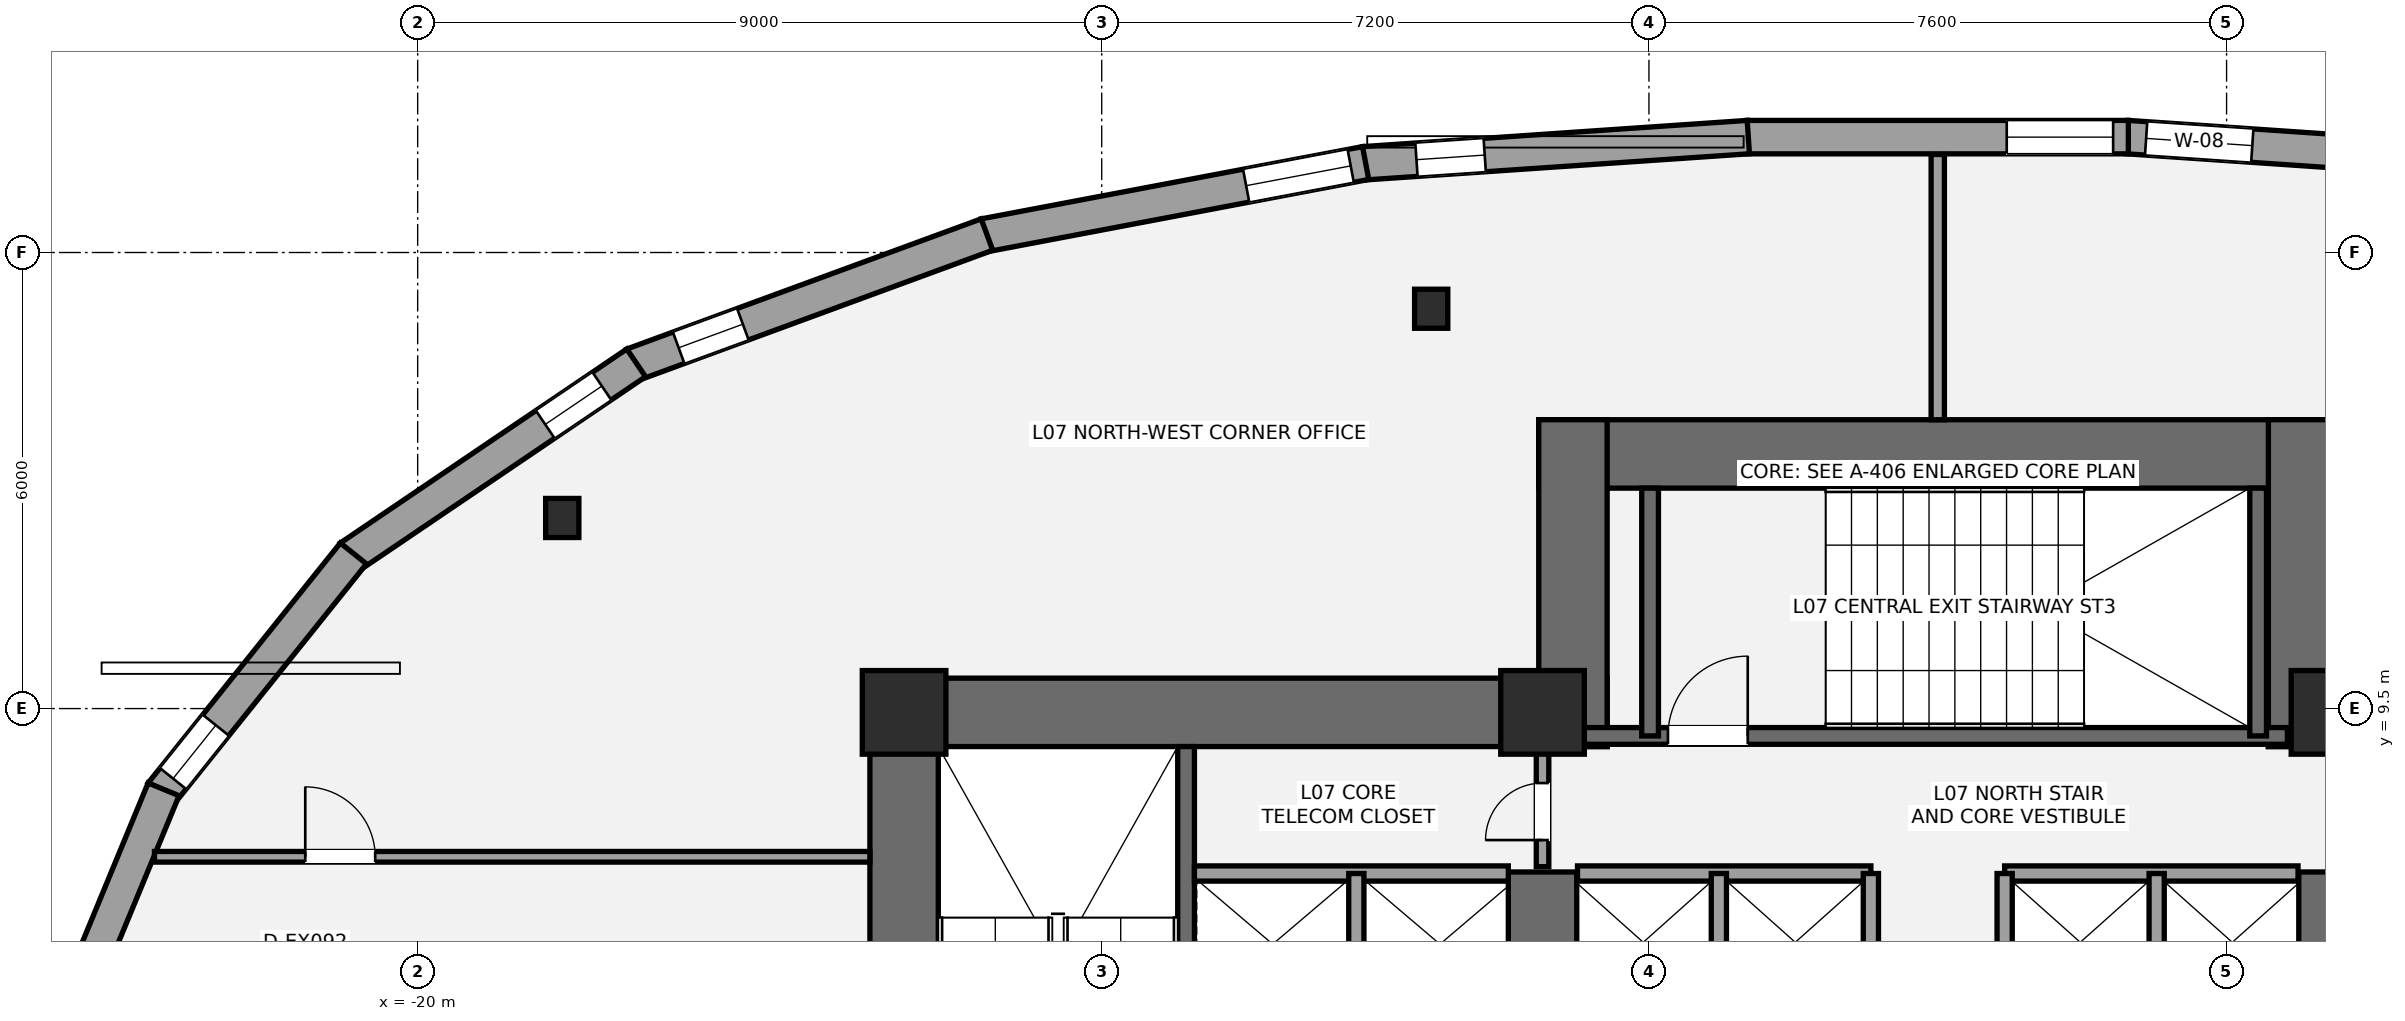
"""IFC4 building model, lengths in metres.
Left out: names, types, materials, properties, quantities, classifications, styles, units other than length and angle.
Written with IfcOpenShell. Run it as: python <this file> out.ifc"""

import sys

from ifc_helpers import new_model, si_unit, direction, frame, frame_2d, origin, origin_2d, place, context, subcontext, project, spatial, rectangle, i_section, extrude, element, fill, save


model = new_model("IFC4")
c1 = context("Model", 3, precision=1e-05, world=origin(), true_north=direction((0.0, 1.0)))
c2 = subcontext(c1, "Body", "Model", "MODEL_VIEW")
j1 = project(units=[si_unit("LENGTHUNIT", "METRE"), si_unit("PLANEANGLEUNIT", "RADIAN")], contexts=[c1])
p1 = place(None, origin())
s1 = spatial("IfcSite", under=j1, at=p1, CompositionType="ELEMENT")
p2 = place(p1, origin())
s2 = spatial("IfcBuilding", under=s1, at=p2, CompositionType="ELEMENT")
p3 = place(p2, frame((0.0, 0.0, 30.6)))
s3 = spatial("IfcBuildingStorey", under=s2, at=p3, CompositionType="ELEMENT", Elevation=30.6)
p4 = place(p3, frame((-13.6, 0.95, 0.0), z_axis=(0.0, 0.0, 1.0), x_axis=(0.0, 1.0, 0.0)))
e1 = element("IfcWall", 1, at=p4, inside=s3, PredefinedType="SHEAR", context=c2, shape_type="SweptSolid", body=[
    extrude(rectangle(XDim=8.95, YDim=0.9, at=frame_2d((4.475, 0.0))), origin(), (0.0, 0.0, 1.0), 3.6),
])
p5 = place(p3, frame((-14.05, 9.45, 0.0), z_axis=(0.0, 0.0, 1.0), x_axis=(1.0, 0.0, 0.0)))
e2 = element("IfcWall", 2, at=p5, inside=s3, PredefinedType="SHEAR", context=c2, shape_type="SweptSolid", body=[
    extrude(rectangle(XDim=9.7, YDim=0.9, at=frame_2d((4.85, 0.0))), origin(), (0.0, 0.0, 1.0), 3.6),
])
p6 = place(p3, frame((-5.2, 5.35, 0.0), z_axis=(0.0, 0.0, 1.0), x_axis=(0.0, 1.0, 0.0)))
e3 = element("IfcWall", 3, at=p6, inside=s3, PredefinedType="SHEAR", context=c2, shape_type="SweptSolid", body=[
    extrude(rectangle(XDim=2.0, YDim=0.9, at=frame_2d((1.0, 0.0))), origin(), (0.0, 0.0, 1.0), 3.6),
])
p7 = place(p3, frame((-9.89, 1.85, 0.0), z_axis=(0.0, 0.0, 1.0), x_axis=(0.0, 1.0, 0.0)))
e4 = element("IfcWall", 4, at=p7, inside=s3, PredefinedType="SHEAR", context=c2, shape_type="SweptSolid", body=[
    extrude(rectangle(XDim=7.15, YDim=0.22, at=frame_2d((3.575, 0.0))), origin(), (0.0, 0.0, 1.0), 3.6),
])
p8 = place(p3, frame((4.35, 9.45, 0.0), z_axis=(0.0, 0.0, 1.0), x_axis=(1.0, 0.0, 0.0)))
e5 = element("IfcWall", 5, at=p8, inside=s3, PredefinedType="SHEAR", context=c2, shape_type="SweptSolid", body=[
    extrude(rectangle(XDim=9.7, YDim=0.9, at=frame_2d((4.85, 0.0))), origin(), (0.0, 0.0, 1.0), 3.6),
])
p9 = place(p3, frame((5.2, 5.35, 0.0), z_axis=(0.0, 0.0, 1.0), x_axis=(0.0, 1.0, 0.0)))
e6 = element("IfcWall", 6, at=p9, inside=s3, PredefinedType="SHEAR", context=c2, shape_type="SweptSolid", body=[
    extrude(rectangle(XDim=2.0, YDim=0.9, at=frame_2d((1.0, 0.0))), origin(), (0.0, 0.0, 1.0), 3.6),
])
p10 = place(p3, frame((-5.25, 12.85, 0.0), z_axis=(0.0, 0.0, 1.0), x_axis=(1.0, 0.0, 0.0)))
e7 = element("IfcWall", 7, at=p10, inside=s3, PredefinedType="SHEAR", context=c2, shape_type="SweptSolid", body=[
    extrude(rectangle(XDim=10.5, YDim=0.9, at=frame_2d((5.25, 0.0))), origin(), (0.0, 0.0, 1.0), 3.6),
])
for number, where, z_axis, x_axis in (
    (8, (-4.8, 9.0, 0.0), (0.0, 0.0, 1.0), (0.0, 1.0, 0.0)),
    (9, (4.8, 9.0, 0.0), (0.0, 0.0, 1.0), (0.0, 1.0, 0.0)),
):
    element("IfcWall", number, at=place(p3, frame(where, z_axis=z_axis, x_axis=x_axis)), inside=s3, PredefinedType="SHEAR", context=c2, shape_type="SweptSolid", body=[
        extrude(rectangle(XDim=4.3, YDim=0.9, at=frame_2d((2.15, 0.0))), origin(), (0.0, 0.0, 1.0), 3.6),
    ])
p11 = place(p3, frame((-4.7, 9.14, 0.0), z_axis=(0.0, 0.0, 1.0), x_axis=(1.0, 0.0, 0.0)))
e10 = element("IfcWall", 10, at=p11, inside=s3, PredefinedType="SHEAR", context=c2, shape_type="SweptSolid", body=[
    extrude(rectangle(XDim=9.3, YDim=0.22, at=frame_2d((4.65, 0.0))), origin(), (0.0, 0.0, 1.0), 3.6),
])
p12 = place(p11, frame((1.15, 0.0, 0.0)))
e11 = element("IfcOpeningElement", 11, at=p12, cuts=e10, PredefinedType="OPENING", context=c2, shape_type="SweptSolid", body=[
    extrude(rectangle(XDim=1.05, YDim=2.15, at=frame_2d((0.525, 1.075))), frame((0.0, 0.12, 0.0), z_axis=(0.0, -1.0, 0.0), x_axis=(1.0, 0.0, 0.0)), (0.0, 0.0, 1.0), 0.24),
])
for number, where, z_axis, x_axis in (
    (12, (-3.785, 9.14, 0.0), (0.0, 0.0, 1.0), (0.0, 1.0, 0.0)),
    (13, (4.215, 9.14, 0.0), (0.0, 0.0, 1.0), (0.0, 1.0, 0.0)),
):
    element("IfcWall", number, at=place(p3, frame(where, z_axis=z_axis, x_axis=x_axis)), inside=s3, PredefinedType="SHEAR", context=c2, shape_type="SweptSolid", body=[
        extrude(rectangle(XDim=3.26, YDim=0.22, at=frame_2d((1.63, 0.0))), origin(), (0.0, 0.0, 1.0), 3.6),
    ])
for number, where, z_axis, x_axis in (
    (14, (-13.6, 9.45, 0.0), (0.0, 0.0, 1.0), (1.0, 0.0, 0.0)),
    (15, (-5.2, 9.45, 0.0), (0.0, 0.0, 1.0), (1.0, 0.0, 0.0)),
    (16, (5.2, 9.45, 0.0), (0.0, 0.0, 1.0), (1.0, 0.0, 0.0)),
):
    element("IfcColumn", number, at=place(p3, frame(where, z_axis=z_axis, x_axis=x_axis)), inside=s3, PredefinedType="COLUMN", context=c2, shape_type="SweptSolid", body=[
        extrude(rectangle(XDim=1.1, YDim=1.1, at=origin_2d()), origin(), (0.0, 0.0, 1.0), 3.6),
    ])
for number, where, z_axis, x_axis in (
    (17, (-6.665, 14.76, 0.0), (0.0, 0.0, 1.0), (1.0, 0.0, 0.0)),
    (18, (-18.098, 12.007, 0.0), (0.0, 0.0, 1.0), (1.0, 0.0, 0.0)),
):
    element("IfcColumn", number, at=place(p3, frame(where, z_axis=z_axis, x_axis=x_axis)), inside=s3, PredefinedType="COLUMN", context=c2, shape_type="SweptSolid", body=[
        extrude(i_section(OverallWidth=0.437, OverallDepth=0.514, WebThickness=0.061, FlangeThickness=0.097, at=origin_2d()), origin(), (0.0, 0.0, 1.0), 3.6),
    ])
p13 = place(p3, frame((2.492, 17.018, 0.0), z_axis=(0.0, 0.0, 1.0), x_axis=(0.997688292846, -0.067956385408, 0.0)))
e19 = element("IfcWall", 19, at=p13, inside=s3, PredefinedType="STANDARD", context=c2, shape_type="SweptSolid", body=[
    extrude(rectangle(XDim=5.073, YDim=0.44, at=frame_2d((2.536, 0.0))), origin(), (0.0, 0.0, 1.0), 2.533),
])
p14 = place(p13, frame((0.25, 0.0, 0.45)))
e20 = element("IfcOpeningElement", 20, at=p14, cuts=e19, PredefinedType="OPENING", context=c2, shape_type="SweptSolid", body=[
    extrude(rectangle(XDim=1.4, YDim=1.55, at=frame_2d((0.7, 0.775))), frame((0.0, 0.23, 0.0), z_axis=(0.0, -1.0, 0.0), x_axis=(1.0, 0.0, 0.0)), (0.0, 0.0, 1.0), 0.46),
])
p15 = place(p3, frame((-2.508, 17.018, 0.0), z_axis=(0.0, 0.0, 1.0), x_axis=(1.0, 0.0, 0.0)))
e21 = element("IfcWall", 21, at=p15, inside=s3, PredefinedType="STANDARD", context=c2, shape_type="SweptSolid", body=[
    extrude(rectangle(XDim=5.015, YDim=0.44, at=frame_2d((2.508, 0.0))), origin(), (0.0, 0.0, 1.0), 2.533),
])
p16 = place(p15, frame((3.415, 0.0, 0.45)))
e22 = element("IfcOpeningElement", 22, at=p16, cuts=e21, PredefinedType="OPENING", context=c2, shape_type="SweptSolid", body=[
    extrude(rectangle(XDim=1.4, YDim=1.55, at=frame_2d((0.7, 0.775))), frame((0.0, 0.23, 0.0), z_axis=(0.0, -1.0, 0.0), x_axis=(1.0, 0.0, 0.0)), (0.0, 0.0, 1.0), 0.46),
])
p17 = place(p3, frame((-7.553, 16.674, 0.0), z_axis=(0.0, 0.0, 1.0), x_axis=(0.997688292846, 0.067956385408, 0.0)))
e23 = element("IfcWall", 23, at=p17, inside=s3, PredefinedType="STANDARD", context=c2, shape_type="SweptSolid", body=[
    extrude(rectangle(XDim=5.073, YDim=0.44, at=frame_2d((2.536, 0.0))), origin(), (0.0, 0.0, 1.0), 2.533),
])
p18 = place(p17, frame((0.696, 0.0, 0.58)))
e24 = element("IfcOpeningElement", 24, at=p18, cuts=e23, PredefinedType="OPENING", context=c2, shape_type="SweptSolid", body=[
    extrude(rectangle(XDim=0.9, YDim=1.35, at=frame_2d((0.45, 0.675))), frame((0.0, 0.23, 0.0), z_axis=(0.0, -1.0, 0.0), x_axis=(1.0, 0.0, 0.0)), (0.0, 0.0, 1.0), 0.46),
])
p19 = place(p3, frame((-12.545, 15.726, 0.0), z_axis=(0.0, 0.0, 1.0), x_axis=(0.982516391845, 0.186176098776, 0.0)))
e25 = element("IfcWall", 25, at=p19, inside=s3, PredefinedType="STANDARD", context=c2, shape_type="SweptSolid", body=[
    extrude(rectangle(XDim=5.106, YDim=0.44, at=frame_2d((2.553, 0.0))), origin(), (0.0, 0.0, 1.0), 2.533),
])
p20 = place(p19, frame((3.506, 0.0, 0.58)))
e26 = element("IfcOpeningElement", 26, at=p20, cuts=e25, PredefinedType="OPENING", context=c2, shape_type="SweptSolid", body=[
    extrude(rectangle(XDim=1.4, YDim=1.55, at=frame_2d((0.7, 0.775))), frame((0.0, 0.23, 0.0), z_axis=(0.0, -1.0, 0.0), x_axis=(1.0, 0.0, 0.0)), (0.0, 0.0, 1.0), 0.46),
])
p21 = place(p3, frame((-17.173, 14.024, 0.0), z_axis=(0.0, 0.0, 1.0), x_axis=(0.938710986641, 0.344705212552, 0.0)))
e27 = element("IfcWall", 27, at=p21, inside=s3, PredefinedType="STANDARD", context=c2, shape_type="SweptSolid", body=[
    extrude(rectangle(XDim=4.967, YDim=0.44, at=frame_2d((2.483, 0.0))), origin(), (0.0, 0.0, 1.0), 2.529),
])
p22 = place(p21, frame((0.646, 0.0, 0.58)))
e28 = element("IfcOpeningElement", 28, at=p22, cuts=e27, PredefinedType="OPENING", context=c2, shape_type="SweptSolid", body=[
    extrude(rectangle(XDim=0.9, YDim=1.35, at=frame_2d((0.45, 0.675))), frame((0.0, 0.23, 0.0), z_axis=(0.0, -1.0, 0.0), x_axis=(1.0, 0.0, 0.0)), (0.0, 0.0, 1.0), 0.46),
])
p23 = place(p3, frame((-20.894, 11.496, 0.0), z_axis=(0.0, 0.0, 1.0), x_axis=(0.828051238664, 0.560652429003, 0.0)))
e29 = element("IfcWall", 29, at=p23, inside=s3, PredefinedType="STANDARD", context=c2, shape_type="SweptSolid", body=[
    extrude(rectangle(XDim=4.552, YDim=0.44, at=frame_2d((2.276, 0.0))), origin(), (0.0, 0.0, 1.0), 2.533),
])
p24 = place(p23, frame((3.107, 0.0, 0.58)))
e30 = element("IfcOpeningElement", 30, at=p24, cuts=e29, PredefinedType="OPENING", context=c2, shape_type="SweptSolid", body=[
    extrude(rectangle(XDim=0.9, YDim=1.35, at=frame_2d((0.45, 0.675))), frame((0.0, 0.23, 0.0), z_axis=(0.0, -1.0, 0.0), x_axis=(1.0, 0.0, 0.0)), (0.0, 0.0, 1.0), 0.46),
])
p25 = place(p3, frame((-23.375, 8.384, 0.0), z_axis=(0.0, 0.0, 1.0), x_axis=(0.625180729177, 0.780480016314, 0.0)))
e31 = element("IfcWall", 31, at=p25, inside=s3, PredefinedType="STANDARD", context=c2, shape_type="SweptSolid", body=[
    extrude(rectangle(XDim=4.045, YDim=0.44, at=frame_2d((2.022, 0.0))), origin(), (0.0, 0.0, 1.0), 2.533),
])
p26 = place(p25, frame((0.25, 0.0, 0.58)))
e32 = element("IfcOpeningElement", 32, at=p26, cuts=e31, PredefinedType="OPENING", context=c2, shape_type="SweptSolid", body=[
    extrude(rectangle(XDim=0.9, YDim=1.35, at=frame_2d((0.45, 0.675))), frame((0.0, 0.23, 0.0), z_axis=(0.0, -1.0, 0.0), x_axis=(1.0, 0.0, 0.0)), (0.0, 0.0, 1.0), 0.46),
])
p27 = place(p3, frame((-24.747, 5.041, 0.0), z_axis=(0.0, 0.0, 1.0), x_axis=(0.381925438614, 0.92419313963, 0.0)))
e33 = element("IfcWall", 33, at=p27, inside=s3, PredefinedType="STANDARD", context=c2, shape_type="SweptSolid", body=[
    extrude(rectangle(XDim=3.676, YDim=0.44, at=frame_2d((1.838, 0.0))), origin(), (0.0, 0.0, 1.0), 2.533),
])
p28 = place(p3, frame((-9.78, 7.33, 0.0), z_axis=(0.0, 0.0, 1.0), x_axis=(1.0, 0.0, 0.0)))
e34 = element("IfcWall", 34, at=p28, inside=s3, PredefinedType="SOLIDWALL", context=c2, shape_type="SweptSolid", body=[
    extrude(rectangle(XDim=4.13, YDim=0.2, at=frame_2d((2.065, 0.0))), origin(), (0.0, 0.0, 1.0), 3.4),
])
p29 = place(p3, frame((-7.65, 5.47, 0.0), z_axis=(0.0, 0.0, 1.0), x_axis=(0.0, 1.0, 0.0)))
e35 = element("IfcWall", 35, at=p29, inside=s3, PredefinedType="SOLIDWALL", context=c2, shape_type="SweptSolid", body=[
    extrude(rectangle(XDim=1.86, YDim=0.2, at=frame_2d((0.93, 0.0))), origin(), (0.0, 0.0, 1.0), 3.4),
])
for number, where, z_axis, x_axis in (
    (36, (-4.74, 7.33, 0.0), (0.0, 0.0, 1.0), (1.0, 0.0, 0.0)),
    (37, (0.88, 7.33, 0.0), (0.0, 0.0, 1.0), (1.0, 0.0, 0.0)),
):
    element("IfcWall", number, at=place(p3, frame(where, z_axis=z_axis, x_axis=x_axis)), inside=s3, PredefinedType="SOLIDWALL", context=c2, shape_type="SweptSolid", body=[
        extrude(rectangle(XDim=3.86, YDim=0.2, at=frame_2d((1.93, 0.0))), origin(), (0.0, 0.0, 1.0), 3.4),
    ])
for number, where, z_axis, x_axis in (
    (38, (-2.88, 5.52, 0.0), (0.0, 0.0, 1.0), (0.0, 1.0, 0.0)),
    (39, (2.88, 5.52, 0.0), (0.0, 0.0, 1.0), (0.0, 1.0, 0.0)),
    (40, (-0.88, 5.52, 0.0), (0.0, 0.0, 1.0), (0.0, 1.0, 0.0)),
    (41, (0.88, 5.52, 0.0), (0.0, 0.0, 1.0), (0.0, 1.0, 0.0)),
):
    element("IfcWall", number, at=place(p3, frame(where, z_axis=z_axis, x_axis=x_axis)), inside=s3, PredefinedType="SOLIDWALL", context=c2, shape_type="SweptSolid", body=[
        extrude(rectangle(XDim=1.81, YDim=0.2, at=frame_2d((0.905, 0.0))), origin(), (0.0, 0.0, 1.0), 3.4),
    ])
p30 = place(p3, frame((-5.2, 7.42, 0.0), z_axis=(0.0, 0.0, 1.0), x_axis=(0.0, 1.0, 0.0)))
e42 = element("IfcWall", 42, at=p30, inside=s3, PredefinedType="PARTITIONING", context=c2, shape_type="SweptSolid", body=[
    extrude(rectangle(XDim=1.58, YDim=0.165, at=frame_2d((0.79, 0.0))), origin(), (0.0, 0.0, 1.0), 3.4),
])
p31 = place(p30, frame((0.35, 0.0, 0.0)))
e43 = element("IfcOpeningElement", 43, at=p31, cuts=e42, PredefinedType="OPENING", context=c2, shape_type="SweptSolid", body=[
    extrude(rectangle(XDim=0.75, YDim=2.1, at=frame_2d((0.375, 1.05))), frame((0.0, 0.093, 0.0), z_axis=(0.0, -1.0, 0.0), x_axis=(1.0, 0.0, 0.0)), (0.0, 0.0, 1.0), 0.185),
])
p32 = place(p3, frame((-23.463, 7.55, 0.0), z_axis=(0.0, 0.0, 1.0), x_axis=(1.0, 0.0, 0.0)))
e44 = element("IfcWall", 44, at=p32, inside=s3, PredefinedType="PARTITIONING", context=c2, shape_type="SweptSolid", body=[
    extrude(rectangle(XDim=9.413, YDim=0.14, at=frame_2d((4.707, 0.0))), origin(), (0.0, 0.0, 1.0), 3.4),
])
p33 = place(p32, frame((1.984, 0.0, 0.0)))
e45 = element("IfcOpeningElement", 45, at=p33, cuts=e44, PredefinedType="OPENING", context=c2, shape_type="SweptSolid", body=[
    extrude(rectangle(XDim=0.92, YDim=2.15, at=frame_2d((0.46, 1.075))), frame((0.0, 0.08, 0.0), z_axis=(0.0, -1.0, 0.0), x_axis=(1.0, 0.0, 0.0)), (0.0, 0.0, 1.0), 0.16),
])
p34 = place(p3, frame((0.0, 13.3, 0.0), z_axis=(0.0, 0.0, 1.0), x_axis=(0.0, 1.0, 0.0)))
e46 = element("IfcWall", 46, at=p34, inside=s3, PredefinedType="PARTITIONING", context=c2, shape_type="SweptSolid", body=[
    extrude(rectangle(XDim=3.49, YDim=0.175, at=frame_2d((1.745, 0.0))), origin(), (0.0, 0.0, 1.0), 3.4),
])
p35 = place(p14, origin())
e47 = element("IfcWindow", 47, at=p35, inside=s3, PartitioningType="SINGLE_PANEL", PredefinedType="WINDOW", context=c2, shape_type="SweptSolid", body=[
    extrude(rectangle(XDim=1.4, YDim=1.55, at=frame_2d((0.7, 0.775))), frame((0.0, -0.01, 0.0), z_axis=(0.0, -1.0, 0.0), x_axis=(1.0, 0.0, 0.0)), (0.0, 0.0, 1.0), 0.06),
])
fill(e20, e47)
p36 = place(p16, origin())
e48 = element("IfcWindow", 48, at=p36, inside=s3, PartitioningType="SINGLE_PANEL", PredefinedType="WINDOW", context=c2, shape_type="SweptSolid", body=[
    extrude(rectangle(XDim=1.4, YDim=1.55, at=frame_2d((0.7, 0.775))), frame((0.0, -0.01, 0.0), z_axis=(0.0, -1.0, 0.0), x_axis=(1.0, 0.0, 0.0)), (0.0, 0.0, 1.0), 0.06),
])
fill(e22, e48)
p37 = place(p18, origin())
e49 = element("IfcWindow", 49, at=p37, inside=s3, PartitioningType="SINGLE_PANEL", PredefinedType="WINDOW", context=c2, shape_type="SweptSolid", body=[
    extrude(rectangle(XDim=0.9, YDim=1.35, at=frame_2d((0.45, 0.675))), frame((0.0, -0.01, 0.0), z_axis=(0.0, -1.0, 0.0), x_axis=(1.0, 0.0, 0.0)), (0.0, 0.0, 1.0), 0.06),
])
fill(e24, e49)
p38 = place(p20, origin())
e50 = element("IfcWindow", 50, at=p38, inside=s3, PartitioningType="SINGLE_PANEL", PredefinedType="WINDOW", context=c2, shape_type="SweptSolid", body=[
    extrude(rectangle(XDim=1.4, YDim=1.55, at=frame_2d((0.7, 0.775))), frame((0.0, -0.01, 0.0), z_axis=(0.0, -1.0, 0.0), x_axis=(1.0, 0.0, 0.0)), (0.0, 0.0, 1.0), 0.06),
])
fill(e26, e50)
p39 = place(p22, origin())
e51 = element("IfcWindow", 51, at=p39, inside=s3, PartitioningType="SINGLE_PANEL", PredefinedType="WINDOW", context=c2, shape_type="SweptSolid", body=[
    extrude(rectangle(XDim=0.9, YDim=1.35, at=frame_2d((0.45, 0.675))), frame((0.0, -0.01, 0.0), z_axis=(0.0, -1.0, 0.0), x_axis=(1.0, 0.0, 0.0)), (0.0, 0.0, 1.0), 0.06),
])
fill(e28, e51)
p40 = place(p24, origin())
e52 = element("IfcWindow", 52, at=p40, inside=s3, PartitioningType="SINGLE_PANEL", PredefinedType="WINDOW", context=c2, shape_type="SweptSolid", body=[
    extrude(rectangle(XDim=0.9, YDim=1.35, at=frame_2d((0.45, 0.675))), frame((0.0, -0.01, 0.0), z_axis=(0.0, -1.0, 0.0), x_axis=(1.0, 0.0, 0.0)), (0.0, 0.0, 1.0), 0.06),
])
fill(e30, e52)
p41 = place(p26, origin())
e53 = element("IfcWindow", 53, at=p41, inside=s3, PartitioningType="SINGLE_PANEL", PredefinedType="WINDOW", context=c2, shape_type="SweptSolid", body=[
    extrude(rectangle(XDim=0.9, YDim=1.35, at=frame_2d((0.45, 0.675))), frame((0.0, -0.01, 0.0), z_axis=(0.0, -1.0, 0.0), x_axis=(1.0, 0.0, 0.0)), (0.0, 0.0, 1.0), 0.06),
])
fill(e32, e53)
p42 = place(p12, origin())
e54 = element("IfcDoor", 54, at=p42, inside=s3, OperationType="SINGLE_SWING_RIGHT", PredefinedType="DOOR", context=c2, shape_type="SweptSolid", body=[
    extrude(rectangle(XDim=1.05, YDim=2.15, at=frame_2d((0.525, 1.075))), frame((0.0, 0.025, 0.0), z_axis=(0.0, -1.0, 0.0), x_axis=(1.0, 0.0, 0.0)), (0.0, 0.0, 1.0), 0.05),
])
fill(e11, e54)
p43 = place(p31, origin())
e55 = element("IfcDoor", 55, at=p43, inside=s3, OperationType="SINGLE_SWING_LEFT", PredefinedType="DOOR", context=c2, shape_type="SweptSolid", body=[
    extrude(rectangle(XDim=0.75, YDim=2.1, at=frame_2d((0.375, 1.05))), frame((0.0, 0.025, 0.0), z_axis=(0.0, -1.0, 0.0), x_axis=(1.0, 0.0, 0.0)), (0.0, 0.0, 1.0), 0.05),
])
fill(e43, e55)
p44 = place(p33, origin())
e56 = element("IfcDoor", 56, at=p44, inside=s3, OperationType="SINGLE_SWING_LEFT", PredefinedType="DOOR", context=c2, shape_type="SweptSolid", body=[
    extrude(rectangle(XDim=0.92, YDim=2.15, at=frame_2d((0.46, 1.075))), frame((0.0, 0.025, 0.0), z_axis=(0.0, -1.0, 0.0), x_axis=(1.0, 0.0, 0.0)), (0.0, 0.0, 1.0), 0.05),
])
fill(e45, e56)
save(model, sys.argv[1])
